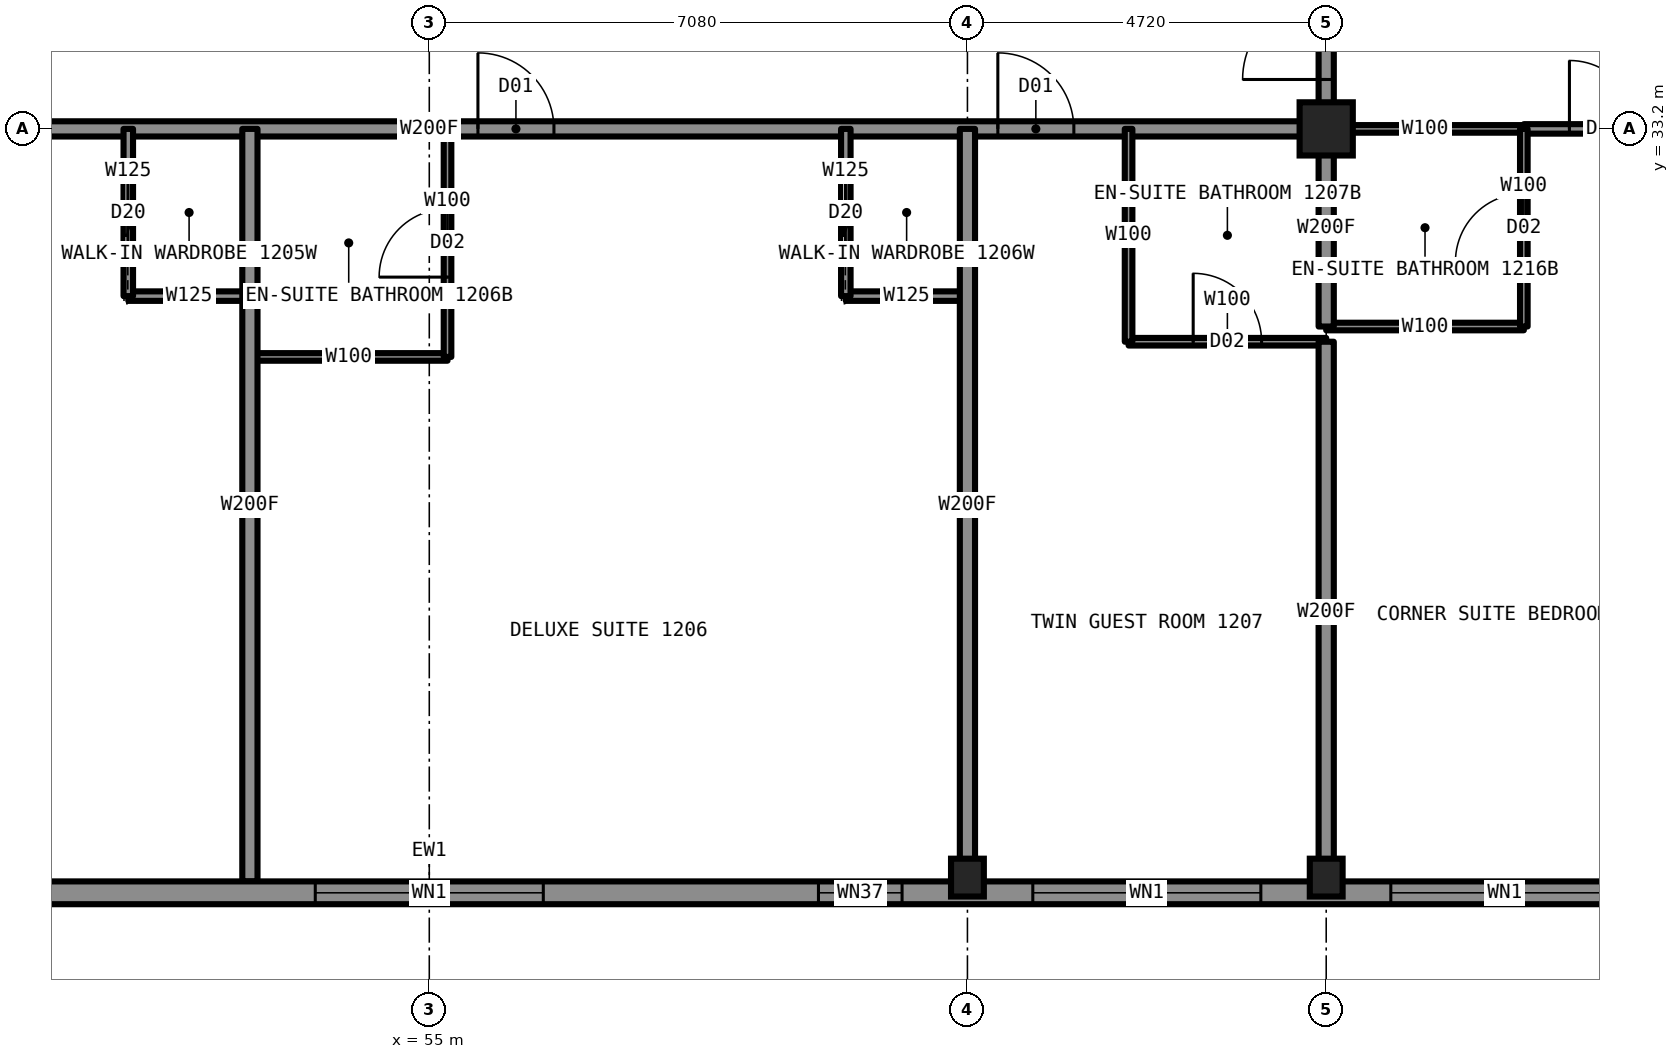
"""IFC4 building model, lengths in metres.
Left out: names, types, materials, properties, quantities, classifications, styles, units other than length and angle.
Written with IfcOpenShell. Run it as: python <this file> out.ifc"""

import sys

from ifc_helpers import new_model, si_unit, direction, frame, frame_2d, origin, origin_2d, place, context, subcontext, project, spatial, rectangle, hollow_rectangle, i_section, extrude, element, fill, save


model = new_model("IFC4")
c1 = context("Model", 3, precision=1e-05, world=origin(), true_north=direction((0.0, 1.0)))
c2 = subcontext(c1, "Body", "Model", "MODEL_VIEW")
j1 = project(units=[si_unit("LENGTHUNIT", "METRE"), si_unit("PLANEANGLEUNIT", "RADIAN")], contexts=[c1])
p1 = place(None, origin())
s1 = spatial("IfcSite", under=j1, at=p1, CompositionType="ELEMENT")
p2 = place(p1, origin())
s2 = spatial("IfcBuilding", under=s1, at=p2, CompositionType="ELEMENT")
p3 = place(p2, frame((0.0, 0.0, 49.5)))
s3 = spatial("IfcBuildingStorey", under=s2, at=p3, CompositionType="ELEMENT", Elevation=49.5)
for number, where, z_axis, x_axis in (
    (1, (62.08, 23.35, 0.0), (0.0, 0.0, 1.0), (1.0, 0.0, 0.0)),
    (2, (66.8, 23.35, 0.0), (0.0, 0.0, 1.0), (1.0, 0.0, 0.0)),
):
    element("IfcColumn", number, at=place(p3, frame(where, z_axis=z_axis, x_axis=x_axis)), inside=s3, PredefinedType="COLUMN", context=c2, shape_type="SweptSolid", body=[
        extrude(i_section(OverallWidth=0.432, OverallDepth=0.498, WebThickness=0.056, FlangeThickness=0.089, at=origin_2d()), origin(), (0.0, 0.0, 1.0), 3.5),
    ])
p4 = place(p3, frame((66.8, 33.2, 0.0), z_axis=(0.0, 0.0, 1.0), x_axis=(1.0, 0.0, 0.0)))
e3 = element("IfcColumn", 3, at=p4, inside=s3, PredefinedType="COLUMN", context=c2, shape_type="SweptSolid", body=[
    extrude(hollow_rectangle(XDim=0.7, YDim=0.7, WallThickness=0.06, at=origin_2d()), origin(), (0.0, 0.0, 1.0), 3.5),
])
p5 = place(p3, frame((66.8, 33.2, 0.0), z_axis=(0.0, 0.0, 1.0), x_axis=(1.0, 0.0, 0.0)))
e4 = element("IfcWall", 4, at=p5, inside=s3, PredefinedType="PARTITIONING", context=c2, shape_type="SweptSolid", body=[
    extrude(rectangle(XDim=2.6, YDim=0.1, at=frame_2d((1.3, 0.0))), origin(), (0.0, 0.0, 1.0), 2.573),
])
p6 = place(p3, frame((43.2, 33.2, 0.0), z_axis=(0.0, 0.0, 1.0), x_axis=(1.0, 0.0, 0.0)))
e5 = element("IfcWall", 5, at=p6, inside=s3, PredefinedType="PARTITIONING", context=c2, shape_type="SweptSolid", body=[
    extrude(rectangle(XDim=23.6, YDim=0.2, at=frame_2d((11.8, 0.0))), origin(), (0.0, 0.0, 1.0), 3.33),
])
p7 = place(p6, frame((3.0, 0.0, 0.0)))
e6 = element("IfcOpeningElement", 6, at=p7, cuts=e5, PredefinedType="OPENING", context=c2, shape_type="SweptSolid", body=[
    extrude(rectangle(XDim=1.0, YDim=2.2, at=frame_2d((0.5, 1.1))), frame((0.0, 0.11, 0.0), z_axis=(0.0, -1.0, 0.0), x_axis=(1.0, 0.0, 0.0)), (0.0, 0.0, 1.0), 0.22),
])
p8 = place(p6, frame((12.44, 0.0, 0.0)))
e7 = element("IfcOpeningElement", 7, at=p8, cuts=e5, PredefinedType="OPENING", context=c2, shape_type="SweptSolid", body=[
    extrude(rectangle(XDim=1.0, YDim=2.2, at=frame_2d((0.5, 1.1))), frame((0.0, 0.11, 0.0), z_axis=(0.0, -1.0, 0.0), x_axis=(1.0, 0.0, 0.0)), (0.0, 0.0, 1.0), 0.22),
])
p9 = place(p6, frame((19.28, 0.0, 0.0)))
e8 = element("IfcOpeningElement", 8, at=p9, cuts=e5, PredefinedType="OPENING", context=c2, shape_type="SweptSolid", body=[
    extrude(rectangle(XDim=1.0, YDim=2.2, at=frame_2d((0.5, 1.1))), frame((0.0, 0.11, 0.0), z_axis=(0.0, -1.0, 0.0), x_axis=(1.0, 0.0, 0.0)), (0.0, 0.0, 1.0), 0.22),
])
p10 = place(p3, frame((69.4, 33.2, 0.0), z_axis=(0.0, 0.0, 1.0), x_axis=(1.0, 0.0, 0.0)))
e9 = element("IfcWall", 9, at=p10, inside=s3, PredefinedType="PARTITIONING", context=c2, shape_type="SweptSolid", body=[
    extrude(rectangle(XDim=7.3, YDim=0.125, at=frame_2d((3.65, 0.0))), origin(), (0.0, 0.0, 1.0), 2.573),
])
p11 = place(p10, frame((0.6, 0.0, 0.0)))
e10 = element("IfcOpeningElement", 10, at=p11, cuts=e9, PredefinedType="OPENING", context=c2, shape_type="SweptSolid", body=[
    extrude(rectangle(XDim=0.9, YDim=2.2, at=frame_2d((0.45, 1.1))), frame((0.0, 0.073, 0.0), z_axis=(0.0, -1.0, 0.0), x_axis=(1.0, 0.0, 0.0)), (0.0, 0.0, 1.0), 0.145),
])
p12 = place(p10, frame((4.4, 0.0, 0.0)))
e11 = element("IfcOpeningElement", 11, at=p12, cuts=e9, PredefinedType="OPENING", context=c2, shape_type="SweptSolid", body=[
    extrude(rectangle(XDim=0.9, YDim=2.2, at=frame_2d((0.45, 1.1))), frame((0.0, 0.073, 0.0), z_axis=(0.0, -1.0, 0.0), x_axis=(1.0, 0.0, 0.0)), (0.0, 0.0, 1.0), 0.145),
])
p13 = place(p3, frame((51.04, 31.0, 0.0), z_axis=(0.0, 0.0, 1.0), x_axis=(1.0, 0.0, 0.0)))
e12 = element("IfcWall", 12, at=p13, inside=s3, PredefinedType="PARTITIONING", context=c2, shape_type="SweptSolid", body=[
    extrude(rectangle(XDim=1.6, YDim=0.125, at=frame_2d((0.8, 0.0))), origin(), (0.0, 0.0, 1.0), 3.33),
])
p14 = place(p3, frame((60.48, 31.0, 0.0), z_axis=(0.0, 0.0, 1.0), x_axis=(1.0, 0.0, 0.0)))
e13 = element("IfcWall", 13, at=p14, inside=s3, PredefinedType="PARTITIONING", context=c2, shape_type="SweptSolid", body=[
    extrude(rectangle(XDim=1.6, YDim=0.125, at=frame_2d((0.8, 0.0))), origin(), (0.0, 0.0, 1.0), 3.33),
])
p15 = place(p3, frame((66.8, 30.6, 0.0), z_axis=(0.0, 0.0, 1.0), x_axis=(1.0, 0.0, 0.0)))
e14 = element("IfcWall", 14, at=p15, inside=s3, PredefinedType="PARTITIONING", context=c2, shape_type="SweptSolid", body=[
    extrude(rectangle(XDim=2.6, YDim=0.1, at=frame_2d((1.3, 0.0))), origin(), (0.0, 0.0, 1.0), 3.33),
])
p16 = place(p3, frame((64.2, 30.4, 0.0), z_axis=(0.0, 0.0, 1.0), x_axis=(1.0, 0.0, 0.0)))
e15 = element("IfcWall", 15, at=p16, inside=s3, PredefinedType="PARTITIONING", context=c2, shape_type="SweptSolid", body=[
    extrude(rectangle(XDim=2.6, YDim=0.1, at=frame_2d((1.3, 0.0))), origin(), (0.0, 0.0, 1.0), 3.33),
])
p17 = place(p16, frame((0.85, 0.0, 0.0)))
e16 = element("IfcOpeningElement", 16, at=p17, cuts=e15, PredefinedType="OPENING", context=c2, shape_type="SweptSolid", body=[
    extrude(rectangle(XDim=0.9, YDim=2.1, at=frame_2d((0.45, 1.05))), frame((0.0, 0.06, 0.0), z_axis=(0.0, -1.0, 0.0), x_axis=(1.0, 0.0, 0.0)), (0.0, 0.0, 1.0), 0.12),
])
p18 = place(p3, frame((52.64, 30.2, 0.0), z_axis=(0.0, 0.0, 1.0), x_axis=(1.0, 0.0, 0.0)))
e17 = element("IfcWall", 17, at=p18, inside=s3, PredefinedType="PARTITIONING", context=c2, shape_type="SweptSolid", body=[
    extrude(rectangle(XDim=2.6, YDim=0.1, at=frame_2d((1.3, 0.0))), origin(), (0.0, 0.0, 1.0), 3.33),
])
p19 = place(p3, frame((52.64, 23.3, 0.0), z_axis=(0.0, 0.0, 1.0), x_axis=(0.0, 1.0, 0.0)))
e18 = element("IfcWall", 18, at=p19, inside=s3, PredefinedType="PARTITIONING", context=c2, shape_type="SweptSolid", body=[
    extrude(rectangle(XDim=9.9, YDim=0.2, at=frame_2d((4.95, 0.0))), origin(), (0.0, 0.0, 1.0), 3.33),
])
p20 = place(p3, frame((51.04, 31.0, 0.0), z_axis=(0.0, 0.0, 1.0), x_axis=(0.0, 1.0, 0.0)))
e19 = element("IfcWall", 19, at=p20, inside=s3, PredefinedType="PARTITIONING", context=c2, shape_type="SweptSolid", body=[
    extrude(rectangle(XDim=2.2, YDim=0.125, at=frame_2d((1.1, 0.0))), origin(), (0.0, 0.0, 1.0), 3.33),
])
p21 = place(p20, frame((0.7, 0.0, 0.0)))
e20 = element("IfcOpeningElement", 20, at=p21, cuts=e19, PredefinedType="OPENING", context=c2, shape_type="SweptSolid", body=[
    extrude(rectangle(XDim=0.8, YDim=2.1, at=frame_2d((0.4, 1.05))), frame((0.0, 0.073, 0.0), z_axis=(0.0, -1.0, 0.0), x_axis=(1.0, 0.0, 0.0)), (0.0, 0.0, 1.0), 0.145),
])
p22 = place(p3, frame((55.24, 30.2, 0.0), z_axis=(0.0, 0.0, 1.0), x_axis=(0.0, 1.0, 0.0)))
e21 = element("IfcWall", 21, at=p22, inside=s3, PredefinedType="PARTITIONING", context=c2, shape_type="SweptSolid", body=[
    extrude(rectangle(XDim=3.0, YDim=0.1, at=frame_2d((1.5, 0.0))), origin(), (0.0, 0.0, 1.0), 3.33),
])
p23 = place(p22, frame((1.05, 0.0, 0.0)))
e22 = element("IfcOpeningElement", 22, at=p23, cuts=e21, PredefinedType="OPENING", context=c2, shape_type="SweptSolid", body=[
    extrude(rectangle(XDim=0.9, YDim=2.1, at=frame_2d((0.45, 1.05))), frame((0.0, 0.06, 0.0), z_axis=(0.0, -1.0, 0.0), x_axis=(1.0, 0.0, 0.0)), (0.0, 0.0, 1.0), 0.12),
])
p24 = place(p3, frame((66.8, 33.2, 0.0), z_axis=(0.0, 0.0, 1.0), x_axis=(0.0, 1.0, 0.0)))
e23 = element("IfcWall", 23, at=p24, inside=s3, PredefinedType="PARTITIONING", context=c2, shape_type="SweptSolid", body=[
    extrude(rectangle(XDim=4.72, YDim=0.2, at=frame_2d((2.36, 0.0))), origin(), (0.0, 0.0, 1.0), 3.33),
])
p25 = place(p24, frame((0.65, 0.0, 0.0)))
e24 = element("IfcOpeningElement", 24, at=p25, cuts=e23, PredefinedType="OPENING", context=c2, shape_type="SweptSolid", body=[
    extrude(rectangle(XDim=1.1, YDim=2.2, at=frame_2d((0.55, 1.1))), frame((0.0, 0.11, 0.0), z_axis=(0.0, -1.0, 0.0), x_axis=(1.0, 0.0, 0.0)), (0.0, 0.0, 1.0), 0.22),
])
p26 = place(p3, frame((66.8, 23.3, 0.0), z_axis=(0.0, 0.0, 1.0), x_axis=(0.0, 1.0, 0.0)))
e25 = element("IfcWall", 25, at=p26, inside=s3, PredefinedType="PARTITIONING", context=c2, shape_type="SweptSolid", body=[
    extrude(rectangle(XDim=7.1, YDim=0.2, at=frame_2d((3.55, 0.0))), origin(), (0.0, 0.0, 1.0), 2.573),
])
p27 = place(p3, frame((66.8, 30.6, 0.0), z_axis=(0.0, 0.0, 1.0), x_axis=(0.0, 1.0, 0.0)))
e26 = element("IfcWall", 26, at=p27, inside=s3, PredefinedType="PARTITIONING", context=c2, shape_type="SweptSolid", body=[
    extrude(rectangle(XDim=2.6, YDim=0.2, at=frame_2d((1.3, 0.0))), origin(), (0.0, 0.0, 1.0), 2.573),
])
p28 = place(p3, frame((69.4, 30.6, 0.0), z_axis=(0.0, 0.0, 1.0), x_axis=(0.0, 1.0, 0.0)))
e27 = element("IfcWall", 27, at=p28, inside=s3, PredefinedType="PARTITIONING", context=c2, shape_type="SweptSolid", body=[
    extrude(rectangle(XDim=2.6, YDim=0.1, at=frame_2d((1.3, 0.0))), origin(), (0.0, 0.0, 1.0), 3.33),
])
p29 = place(p28, frame((0.85, 0.0, 0.0)))
e28 = element("IfcOpeningElement", 28, at=p29, cuts=e27, PredefinedType="OPENING", context=c2, shape_type="SweptSolid", body=[
    extrude(rectangle(XDim=0.9, YDim=2.1, at=frame_2d((0.45, 1.05))), frame((0.0, 0.06, 0.0), z_axis=(0.0, -1.0, 0.0), x_axis=(1.0, 0.0, 0.0)), (0.0, 0.0, 1.0), 0.12),
])
p30 = place(p3, frame((60.48, 31.0, 0.0), z_axis=(0.0, 0.0, 1.0), x_axis=(0.0, 1.0, 0.0)))
e29 = element("IfcWall", 29, at=p30, inside=s3, PredefinedType="PARTITIONING", context=c2, shape_type="SweptSolid", body=[
    extrude(rectangle(XDim=2.2, YDim=0.125, at=frame_2d((1.1, 0.0))), origin(), (0.0, 0.0, 1.0), 3.33),
])
p31 = place(p30, frame((0.7, 0.0, 0.0)))
e30 = element("IfcOpeningElement", 30, at=p31, cuts=e29, PredefinedType="OPENING", context=c2, shape_type="SweptSolid", body=[
    extrude(rectangle(XDim=0.8, YDim=2.1, at=frame_2d((0.4, 1.05))), frame((0.0, 0.073, 0.0), z_axis=(0.0, -1.0, 0.0), x_axis=(1.0, 0.0, 0.0)), (0.0, 0.0, 1.0), 0.145),
])
p32 = place(p3, frame((62.08, 23.3, 0.0), z_axis=(0.0, 0.0, 1.0), x_axis=(0.0, 1.0, 0.0)))
e31 = element("IfcWall", 31, at=p32, inside=s3, PredefinedType="PARTITIONING", context=c2, shape_type="SweptSolid", body=[
    extrude(rectangle(XDim=9.9, YDim=0.2, at=frame_2d((4.95, 0.0))), origin(), (0.0, 0.0, 1.0), 2.573),
])
p33 = place(p3, frame((64.2, 30.4, 0.0), z_axis=(0.0, 0.0, 1.0), x_axis=(0.0, 1.0, 0.0)))
e32 = element("IfcWall", 32, at=p33, inside=s3, PredefinedType="PARTITIONING", context=c2, shape_type="SweptSolid", body=[
    extrude(rectangle(XDim=2.8, YDim=0.1, at=frame_2d((1.4, 0.0))), origin(), (0.0, 0.0, 1.0), 3.33),
])
p34 = place(p3, frame((38.5, 23.15, 0.0), z_axis=(0.0, 0.0, 1.0), x_axis=(1.0, 0.0, 0.0)))
e33 = element("IfcWall", 33, at=p34, inside=s3, PredefinedType="SOLIDWALL", context=c2, shape_type="SweptSolid", body=[
    extrude(rectangle(XDim=33.0, YDim=0.3, at=frame_2d((16.5, 0.0))), origin(), (0.0, 0.0, 1.0), 2.83),
])
p35 = place(p34, frame((0.85, 0.0, 0.5)))
e34 = element("IfcOpeningElement", 34, at=p35, cuts=e33, PredefinedType="OPENING", context=c2, shape_type="SweptSolid", body=[
    extrude(rectangle(XDim=3.0, YDim=2.0, at=frame_2d((1.5, 1.0))), frame((0.0, 0.16, 0.0), z_axis=(0.0, -1.0, 0.0), x_axis=(1.0, 0.0, 0.0)), (0.0, 0.0, 1.0), 0.32),
])
p36 = place(p34, frame((5.56, 0.0, 0.5)))
e35 = element("IfcOpeningElement", 35, at=p36, cuts=e33, PredefinedType="OPENING", context=c2, shape_type="SweptSolid", body=[
    extrude(rectangle(XDim=3.0, YDim=2.0, at=frame_2d((1.5, 1.0))), frame((0.0, 0.16, 0.0), z_axis=(0.0, -1.0, 0.0), x_axis=(1.0, 0.0, 0.0)), (0.0, 0.0, 1.0), 0.32),
])
p37 = place(p34, frame((10.28, 0.0, 1.1)))
e36 = element("IfcOpeningElement", 36, at=p37, cuts=e33, PredefinedType="OPENING", context=c2, shape_type="SweptSolid", body=[
    extrude(rectangle(XDim=1.1, YDim=1.4, at=frame_2d((0.55, 0.7))), frame((0.0, 0.16, 0.0), z_axis=(0.0, -1.0, 0.0), x_axis=(1.0, 0.0, 0.0)), (0.0, 0.0, 1.0), 0.32),
])
p38 = place(p34, frame((15.0, 0.0, 0.5)))
e37 = element("IfcOpeningElement", 37, at=p38, cuts=e33, PredefinedType="OPENING", context=c2, shape_type="SweptSolid", body=[
    extrude(rectangle(XDim=3.0, YDim=2.0, at=frame_2d((1.5, 1.0))), frame((0.0, 0.16, 0.0), z_axis=(0.0, -1.0, 0.0), x_axis=(1.0, 0.0, 0.0)), (0.0, 0.0, 1.0), 0.32),
])
p39 = place(p34, frame((21.62, 0.0, 1.1)))
e38 = element("IfcOpeningElement", 38, at=p39, cuts=e33, PredefinedType="OPENING", context=c2, shape_type="SweptSolid", body=[
    extrude(rectangle(XDim=1.1, YDim=1.4, at=frame_2d((0.55, 0.7))), frame((0.0, 0.16, 0.0), z_axis=(0.0, -1.0, 0.0), x_axis=(1.0, 0.0, 0.0)), (0.0, 0.0, 1.0), 0.32),
])
p40 = place(p34, frame((24.44, 0.0, 0.5)))
e39 = element("IfcOpeningElement", 39, at=p40, cuts=e33, PredefinedType="OPENING", context=c2, shape_type="SweptSolid", body=[
    extrude(rectangle(XDim=3.0, YDim=2.0, at=frame_2d((1.5, 1.0))), frame((0.0, 0.16, 0.0), z_axis=(0.0, -1.0, 0.0), x_axis=(1.0, 0.0, 0.0)), (0.0, 0.0, 1.0), 0.32),
])
p41 = place(p34, frame((29.15, 0.0, 0.5)))
e40 = element("IfcOpeningElement", 40, at=p41, cuts=e33, PredefinedType="OPENING", context=c2, shape_type="SweptSolid", body=[
    extrude(rectangle(XDim=3.0, YDim=2.0, at=frame_2d((1.5, 1.0))), frame((0.0, 0.16, 0.0), z_axis=(0.0, -1.0, 0.0), x_axis=(1.0, 0.0, 0.0)), (0.0, 0.0, 1.0), 0.32),
])
p42 = place(p21, origin())
e41 = element("IfcDoor", 41, at=p42, inside=s3, OperationType="SLIDING_TO_LEFT", PredefinedType="DOOR", context=c2, shape_type="SweptSolid", body=[
    extrude(rectangle(XDim=0.8, YDim=2.1, at=frame_2d((0.4, 1.05))), frame((0.0, 0.025, 0.0), z_axis=(0.0, -1.0, 0.0), x_axis=(1.0, 0.0, 0.0)), (0.0, 0.0, 1.0), 0.05),
])
fill(e20, e41)
p43 = place(p8, origin())
e42 = element("IfcDoor", 42, at=p43, inside=s3, OperationType="SINGLE_SWING_LEFT", PredefinedType="DOOR", context=c2, shape_type="SweptSolid", body=[
    extrude(rectangle(XDim=1.0, YDim=2.2, at=frame_2d((0.5, 1.1))), frame((0.0, 0.025, 0.0), z_axis=(0.0, -1.0, 0.0), x_axis=(1.0, 0.0, 0.0)), (0.0, 0.0, 1.0), 0.05),
])
fill(e7, e42)
p44 = place(p23, origin())
e43 = element("IfcDoor", 43, at=p44, inside=s3, OperationType="SINGLE_SWING_RIGHT", PredefinedType="DOOR", context=c2, shape_type="SweptSolid", body=[
    extrude(rectangle(XDim=0.9, YDim=2.1, at=frame_2d((0.45, 1.05))), frame((0.0, 0.025, 0.0), z_axis=(0.0, -1.0, 0.0), x_axis=(1.0, 0.0, 0.0)), (0.0, 0.0, 1.0), 0.05),
])
fill(e22, e43)
p45 = place(p31, origin())
e44 = element("IfcDoor", 44, at=p45, inside=s3, OperationType="SLIDING_TO_LEFT", PredefinedType="DOOR", context=c2, shape_type="SweptSolid", body=[
    extrude(rectangle(XDim=0.8, YDim=2.1, at=frame_2d((0.4, 1.05))), frame((0.0, 0.025, 0.0), z_axis=(0.0, -1.0, 0.0), x_axis=(1.0, 0.0, 0.0)), (0.0, 0.0, 1.0), 0.05),
])
fill(e30, e44)
p46 = place(p9, origin())
e45 = element("IfcDoor", 45, at=p46, inside=s3, OperationType="SINGLE_SWING_LEFT", PredefinedType="DOOR", context=c2, shape_type="SweptSolid", body=[
    extrude(rectangle(XDim=1.0, YDim=2.2, at=frame_2d((0.5, 1.1))), frame((0.0, 0.025, 0.0), z_axis=(0.0, -1.0, 0.0), x_axis=(1.0, 0.0, 0.0)), (0.0, 0.0, 1.0), 0.05),
])
fill(e8, e45)
p47 = place(p17, origin())
e46 = element("IfcDoor", 46, at=p47, inside=s3, OperationType="SINGLE_SWING_RIGHT", PredefinedType="DOOR", context=c2, shape_type="SweptSolid", body=[
    extrude(rectangle(XDim=0.9, YDim=2.1, at=frame_2d((0.45, 1.05))), frame((0.0, 0.025, 0.0), z_axis=(0.0, -1.0, 0.0), x_axis=(1.0, 0.0, 0.0)), (0.0, 0.0, 1.0), 0.05),
])
fill(e16, e46)
p48 = place(p25, origin())
e47 = element("IfcDoor", 47, at=p48, inside=s3, OperationType="SINGLE_SWING_LEFT", PredefinedType="DOOR", context=c2, shape_type="SweptSolid", body=[
    extrude(rectangle(XDim=1.1, YDim=2.2, at=frame_2d((0.55, 1.1))), frame((0.0, 0.025, 0.0), z_axis=(0.0, -1.0, 0.0), x_axis=(1.0, 0.0, 0.0)), (0.0, 0.0, 1.0), 0.05),
])
fill(e24, e47)
p49 = place(p29, origin())
e48 = element("IfcDoor", 48, at=p49, inside=s3, OperationType="SINGLE_SWING_RIGHT", PredefinedType="DOOR", context=c2, shape_type="SweptSolid", body=[
    extrude(rectangle(XDim=0.9, YDim=2.1, at=frame_2d((0.45, 1.05))), frame((0.0, 0.025, 0.0), z_axis=(0.0, -1.0, 0.0), x_axis=(1.0, 0.0, 0.0)), (0.0, 0.0, 1.0), 0.05),
])
fill(e28, e48)
p50 = place(p11, origin())
e49 = element("IfcDoor", 49, at=p50, inside=s3, OperationType="SINGLE_SWING_LEFT", PredefinedType="DOOR", context=c2, shape_type="SweptSolid", body=[
    extrude(rectangle(XDim=0.9, YDim=2.2, at=frame_2d((0.45, 1.1))), frame((0.0, 0.025, 0.0), z_axis=(0.0, -1.0, 0.0), x_axis=(1.0, 0.0, 0.0)), (0.0, 0.0, 1.0), 0.05),
])
fill(e10, e49)
p51 = place(p38, origin())
e50 = element("IfcWindow", 50, at=p51, inside=s3, PartitioningType="SINGLE_PANEL", PredefinedType="WINDOW", context=c2, shape_type="SweptSolid", body=[
    extrude(rectangle(XDim=3.0, YDim=2.0, at=frame_2d((1.5, 1.0))), frame((0.0, 0.03, 0.0), z_axis=(0.0, -1.0, 0.0), x_axis=(1.0, 0.0, 0.0)), (0.0, 0.0, 1.0), 0.06),
])
fill(e37, e50)
p52 = place(p39, origin())
e51 = element("IfcWindow", 51, at=p52, inside=s3, PartitioningType="SINGLE_PANEL", PredefinedType="WINDOW", context=c2, shape_type="SweptSolid", body=[
    extrude(rectangle(XDim=1.1, YDim=1.4, at=frame_2d((0.55, 0.7))), frame((0.0, 0.03, 0.0), z_axis=(0.0, -1.0, 0.0), x_axis=(1.0, 0.0, 0.0)), (0.0, 0.0, 1.0), 0.06),
])
fill(e38, e51)
p53 = place(p40, origin())
e52 = element("IfcWindow", 52, at=p53, inside=s3, PartitioningType="SINGLE_PANEL", PredefinedType="WINDOW", context=c2, shape_type="SweptSolid", body=[
    extrude(rectangle(XDim=3.0, YDim=2.0, at=frame_2d((1.5, 1.0))), frame((0.0, 0.03, 0.0), z_axis=(0.0, -1.0, 0.0), x_axis=(1.0, 0.0, 0.0)), (0.0, 0.0, 1.0), 0.06),
])
fill(e39, e52)
p54 = place(p41, origin())
e53 = element("IfcWindow", 53, at=p54, inside=s3, PartitioningType="SINGLE_PANEL", PredefinedType="WINDOW", context=c2, shape_type="SweptSolid", body=[
    extrude(rectangle(XDim=3.0, YDim=2.0, at=frame_2d((1.5, 1.0))), frame((0.0, 0.03, 0.0), z_axis=(0.0, -1.0, 0.0), x_axis=(1.0, 0.0, 0.0)), (0.0, 0.0, 1.0), 0.06),
])
fill(e40, e53)
save(model, sys.argv[1])
